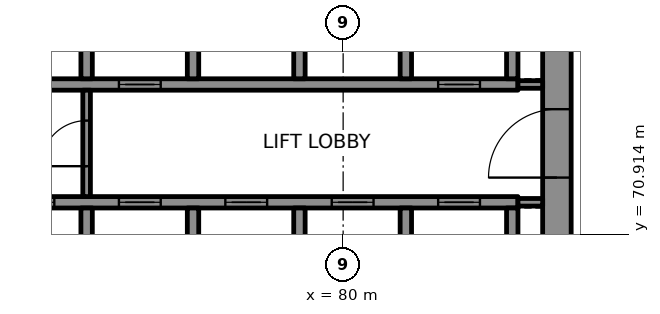
"""IFC4 building model, lengths in metres.
Left out: names, types, materials, properties, quantities, classifications, styles, units other than length and angle.
Written with IfcOpenShell. Run it as: python <this file> out.ifc"""

import sys

from ifc_helpers import new_model, si_unit, direction, frame, frame_2d, origin, place, context, subcontext, project, spatial, rectangle, extrude, element, fill, save


model = new_model("IFC4")
c1 = context("Model", 3, precision=1e-05, world=origin(), true_north=direction((0.0, 1.0)))
c2 = subcontext(c1, "Body", "Model", "MODEL_VIEW")
j1 = project(units=[si_unit("LENGTHUNIT", "METRE"), si_unit("PLANEANGLEUNIT", "RADIAN")], contexts=[c1])
p1 = place(None, origin())
s1 = spatial("IfcSite", under=j1, at=p1, CompositionType="ELEMENT")
p2 = place(p1, origin())
s2 = spatial("IfcBuilding", under=s1, at=p2, CompositionType="ELEMENT")
p3 = place(p2, frame((0.0, 0.0, 163.6)))
s3 = spatial("IfcBuildingStorey", under=s2, at=p3, CompositionType="ELEMENT", Elevation=163.6)
p4 = place(p3, frame((85.625, 67.75, 0.0), z_axis=(0.0, 0.0, 1.0), x_axis=(0.0, 1.0, 0.0)))
e1 = element("IfcWall", 1, at=p4, inside=s3, PredefinedType="SHEAR", context=c2, shape_type="SweptSolid", body=[
    extrude(rectangle(XDim=14.5, YDim=0.75, at=frame_2d((7.25, 0.0))), origin(), (0.0, 0.0, 1.0), 3.7),
])
p5 = place(p4, frame((4.65, 0.0, 0.0)))
e2 = element("IfcOpeningElement", 2, at=p5, cuts=e1, PredefinedType="OPENING", context=c2, shape_type="SweptSolid", body=[
    extrude(rectangle(XDim=1.8, YDim=2.1, at=frame_2d((0.9, 1.05))), frame((0.0, 0.385, 0.0), z_axis=(0.0, -1.0, 0.0), x_axis=(1.0, 0.0, 0.0)), (0.0, 0.0, 1.0), 0.77),
])
p6 = place(p4, frame((11.8, 0.0, 0.0)))
e3 = element("IfcOpeningElement", 3, at=p6, cuts=e1, PredefinedType="OPENING", context=c2, shape_type="SweptSolid", body=[
    extrude(rectangle(XDim=0.9, YDim=2.1, at=frame_2d((0.45, 1.05))), frame((0.0, 0.385, 0.0), z_axis=(0.0, -1.0, 0.0), x_axis=(1.0, 0.0, 0.0)), (0.0, 0.0, 1.0), 0.77),
])
p7 = place(p3, frame((70.3, 71.75, 0.0), z_axis=(0.0, 0.0, 1.0), x_axis=(1.0, 0.0, 0.0)))
e4 = element("IfcWall", 4, at=p7, inside=s3, PredefinedType="SHEAR", context=c2, shape_type="SweptSolid", body=[
    extrude(rectangle(XDim=14.3, YDim=0.3, at=frame_2d((7.15, 0.0))), origin(), (0.0, 0.0, 1.0), 3.7),
])
p8 = place(p7, frame((1.0, 0.0, 0.0)))
e5 = element("IfcOpeningElement", 5, at=p8, cuts=e4, PredefinedType="OPENING", context=c2, shape_type="SweptSolid", body=[
    extrude(rectangle(XDim=1.1, YDim=2.1, at=frame_2d((0.55, 1.05))), frame((0.0, 0.16, 0.0), z_axis=(0.0, -1.0, 0.0), x_axis=(1.0, 0.0, 0.0)), (0.0, 0.0, 1.0), 0.32),
])
p9 = place(p7, frame((3.8, 0.0, 0.0)))
e6 = element("IfcOpeningElement", 6, at=p9, cuts=e4, PredefinedType="OPENING", context=c2, shape_type="SweptSolid", body=[
    extrude(rectangle(XDim=1.1, YDim=2.1, at=frame_2d((0.55, 1.05))), frame((0.0, 0.16, 0.0), z_axis=(0.0, -1.0, 0.0), x_axis=(1.0, 0.0, 0.0)), (0.0, 0.0, 1.0), 0.32),
])
p10 = place(p7, frame((6.6, 0.0, 0.0)))
e7 = element("IfcOpeningElement", 7, at=p10, cuts=e4, PredefinedType="OPENING", context=c2, shape_type="SweptSolid", body=[
    extrude(rectangle(XDim=1.1, YDim=2.1, at=frame_2d((0.55, 1.05))), frame((0.0, 0.16, 0.0), z_axis=(0.0, -1.0, 0.0), x_axis=(1.0, 0.0, 0.0)), (0.0, 0.0, 1.0), 0.32),
])
p11 = place(p7, frame((9.4, 0.0, 0.0)))
e8 = element("IfcOpeningElement", 8, at=p11, cuts=e4, PredefinedType="OPENING", context=c2, shape_type="SweptSolid", body=[
    extrude(rectangle(XDim=1.1, YDim=2.1, at=frame_2d((0.55, 1.05))), frame((0.0, 0.16, 0.0), z_axis=(0.0, -1.0, 0.0), x_axis=(1.0, 0.0, 0.0)), (0.0, 0.0, 1.0), 0.32),
])
p12 = place(p7, frame((12.2, 0.0, 0.0)))
e9 = element("IfcOpeningElement", 9, at=p12, cuts=e4, PredefinedType="OPENING", context=c2, shape_type="SweptSolid", body=[
    extrude(rectangle(XDim=1.1, YDim=2.1, at=frame_2d((0.55, 1.05))), frame((0.0, 0.16, 0.0), z_axis=(0.0, -1.0, 0.0), x_axis=(1.0, 0.0, 0.0)), (0.0, 0.0, 1.0), 0.32),
])
p13 = place(p3, frame((70.3, 74.85, 0.0), z_axis=(0.0, 0.0, 1.0), x_axis=(1.0, 0.0, 0.0)))
e10 = element("IfcWall", 10, at=p13, inside=s3, PredefinedType="SHEAR", context=c2, shape_type="SweptSolid", body=[
    extrude(rectangle(XDim=14.3, YDim=0.3, at=frame_2d((7.15, 0.0))), origin(), (0.0, 0.0, 1.0), 3.7),
])
p14 = place(p13, frame((3.8, 0.0, 0.0)))
e11 = element("IfcOpeningElement", 11, at=p14, cuts=e10, PredefinedType="OPENING", context=c2, shape_type="SweptSolid", body=[
    extrude(rectangle(XDim=1.1, YDim=2.1, at=frame_2d((0.55, 1.05))), frame((0.0, 0.16, 0.0), z_axis=(0.0, -1.0, 0.0), x_axis=(1.0, 0.0, 0.0)), (0.0, 0.0, 1.0), 0.32),
])
p15 = place(p13, frame((12.2, 0.0, 0.0)))
e12 = element("IfcOpeningElement", 12, at=p15, cuts=e10, PredefinedType="OPENING", context=c2, shape_type="SweptSolid", body=[
    extrude(rectangle(XDim=1.1, YDim=2.1, at=frame_2d((0.55, 1.05))), frame((0.0, 0.16, 0.0), z_axis=(0.0, -1.0, 0.0), x_axis=(1.0, 0.0, 0.0)), (0.0, 0.0, 1.0), 0.32),
])
for number, where, z_axis, x_axis in (
    (13, (73.25, 69.0, 0.0), (0.0, 0.0, 1.0), (0.0, 1.0, 0.0)),
    (14, (73.25, 75.0, 0.0), (0.0, 0.0, 1.0), (0.0, 1.0, 0.0)),
    (15, (76.05, 69.0, 0.0), (0.0, 0.0, 1.0), (0.0, 1.0, 0.0)),
    (16, (76.05, 75.0, 0.0), (0.0, 0.0, 1.0), (0.0, 1.0, 0.0)),
    (17, (78.85, 69.0, 0.0), (0.0, 0.0, 1.0), (0.0, 1.0, 0.0)),
    (18, (78.85, 75.0, 0.0), (0.0, 0.0, 1.0), (0.0, 1.0, 0.0)),
    (19, (81.65, 69.0, 0.0), (0.0, 0.0, 1.0), (0.0, 1.0, 0.0)),
    (20, (81.65, 75.0, 0.0), (0.0, 0.0, 1.0), (0.0, 1.0, 0.0)),
    (21, (84.45, 69.0, 0.0), (0.0, 0.0, 1.0), (0.0, 1.0, 0.0)),
    (22, (84.45, 75.0, 0.0), (0.0, 0.0, 1.0), (0.0, 1.0, 0.0)),
):
    element("IfcWall", number, at=place(p3, frame(where, z_axis=z_axis, x_axis=x_axis)), inside=s3, PredefinedType="SHEAR", context=c2, shape_type="SweptSolid", body=[
        extrude(rectangle(XDim=2.6, YDim=0.3, at=frame_2d((1.3, 0.0))), origin(), (0.0, 0.0, 1.0), 3.7),
    ])
for number, where, z_axis, x_axis in (
    (23, (84.6, 71.75, 0.0), (0.0, 0.0, 1.0), (1.0, 0.0, 0.0)),
    (24, (84.6, 74.85, 0.0), (0.0, 0.0, 1.0), (1.0, 0.0, 0.0)),
):
    element("IfcWall", number, at=place(p3, frame(where, z_axis=z_axis, x_axis=x_axis)), inside=s3, PredefinedType="PARTITIONING", context=c2, shape_type="SweptSolid", body=[
        extrude(rectangle(XDim=0.65, YDim=0.2, at=frame_2d((0.325, 0.0))), origin(), (0.0, 0.0, 1.0), 3.7),
    ])
p16 = place(p3, frame((73.25, 71.9, 0.0), z_axis=(0.0, 0.0, 1.0), x_axis=(0.0, 1.0, 0.0)))
e25 = element("IfcWall", 25, at=p16, inside=s3, PredefinedType="PARTITIONING", context=c2, shape_type="SweptSolid", body=[
    extrude(rectangle(XDim=2.8, YDim=0.2, at=frame_2d((1.4, 0.0))), origin(), (0.0, 0.0, 1.0), 3.7),
])
p17 = place(p16, frame((0.8, 0.0, 0.0)))
e26 = element("IfcOpeningElement", 26, at=p17, cuts=e25, PredefinedType="OPENING", context=c2, shape_type="SweptSolid", body=[
    extrude(rectangle(XDim=1.2, YDim=2.1, at=frame_2d((0.6, 1.05))), frame((0.0, 0.11, 0.0), z_axis=(0.0, -1.0, 0.0), x_axis=(1.0, 0.0, 0.0)), (0.0, 0.0, 1.0), 0.22),
])
p18 = place(p8, origin())
e27 = element("IfcDoor", 27, at=p18, inside=s3, OperationType="DOUBLE_DOOR_SLIDING", PredefinedType="DOOR", context=c2, shape_type="SweptSolid", body=[
    extrude(rectangle(XDim=1.1, YDim=2.1, at=frame_2d((0.55, 1.05))), frame((0.0, 0.025, 0.0), z_axis=(0.0, -1.0, 0.0), x_axis=(1.0, 0.0, 0.0)), (0.0, 0.0, 1.0), 0.05),
])
fill(e5, e27)
p19 = place(p9, origin())
e28 = element("IfcDoor", 28, at=p19, inside=s3, OperationType="DOUBLE_DOOR_SLIDING", PredefinedType="DOOR", context=c2, shape_type="SweptSolid", body=[
    extrude(rectangle(XDim=1.1, YDim=2.1, at=frame_2d((0.55, 1.05))), frame((0.0, 0.025, 0.0), z_axis=(0.0, -1.0, 0.0), x_axis=(1.0, 0.0, 0.0)), (0.0, 0.0, 1.0), 0.05),
])
fill(e6, e28)
p20 = place(p10, origin())
e29 = element("IfcDoor", 29, at=p20, inside=s3, OperationType="DOUBLE_DOOR_SLIDING", PredefinedType="DOOR", context=c2, shape_type="SweptSolid", body=[
    extrude(rectangle(XDim=1.1, YDim=2.1, at=frame_2d((0.55, 1.05))), frame((0.0, 0.025, 0.0), z_axis=(0.0, -1.0, 0.0), x_axis=(1.0, 0.0, 0.0)), (0.0, 0.0, 1.0), 0.05),
])
fill(e7, e29)
p21 = place(p11, origin())
e30 = element("IfcDoor", 30, at=p21, inside=s3, OperationType="DOUBLE_DOOR_SLIDING", PredefinedType="DOOR", context=c2, shape_type="SweptSolid", body=[
    extrude(rectangle(XDim=1.1, YDim=2.1, at=frame_2d((0.55, 1.05))), frame((0.0, 0.025, 0.0), z_axis=(0.0, -1.0, 0.0), x_axis=(1.0, 0.0, 0.0)), (0.0, 0.0, 1.0), 0.05),
])
fill(e8, e30)
p22 = place(p12, origin())
e31 = element("IfcDoor", 31, at=p22, inside=s3, OperationType="DOUBLE_DOOR_SLIDING", PredefinedType="DOOR", context=c2, shape_type="SweptSolid", body=[
    extrude(rectangle(XDim=1.1, YDim=2.1, at=frame_2d((0.55, 1.05))), frame((0.0, 0.025, 0.0), z_axis=(0.0, -1.0, 0.0), x_axis=(1.0, 0.0, 0.0)), (0.0, 0.0, 1.0), 0.05),
])
fill(e9, e31)
p23 = place(p14, origin())
e32 = element("IfcDoor", 32, at=p23, inside=s3, OperationType="DOUBLE_DOOR_SLIDING", PredefinedType="DOOR", context=c2, shape_type="SweptSolid", body=[
    extrude(rectangle(XDim=1.1, YDim=2.1, at=frame_2d((0.55, 1.05))), frame((0.0, 0.025, 0.0), z_axis=(0.0, -1.0, 0.0), x_axis=(1.0, 0.0, 0.0)), (0.0, 0.0, 1.0), 0.05),
])
fill(e11, e32)
p24 = place(p15, origin())
e33 = element("IfcDoor", 33, at=p24, inside=s3, OperationType="DOUBLE_DOOR_SLIDING", PredefinedType="DOOR", context=c2, shape_type="SweptSolid", body=[
    extrude(rectangle(XDim=1.1, YDim=2.1, at=frame_2d((0.55, 1.05))), frame((0.0, 0.025, 0.0), z_axis=(0.0, -1.0, 0.0), x_axis=(1.0, 0.0, 0.0)), (0.0, 0.0, 1.0), 0.05),
])
fill(e12, e33)
p25 = place(p17, origin())
e34 = element("IfcDoor", 34, at=p25, inside=s3, OperationType="SINGLE_SWING_LEFT", PredefinedType="DOOR", context=c2, shape_type="SweptSolid", body=[
    extrude(rectangle(XDim=1.2, YDim=2.1, at=frame_2d((0.6, 1.05))), frame((0.0, 0.025, 0.0), z_axis=(0.0, -1.0, 0.0), x_axis=(1.0, 0.0, 0.0)), (0.0, 0.0, 1.0), 0.05),
])
fill(e26, e34)
p26 = place(p5, origin())
e35 = element("IfcDoor", 35, at=p26, inside=s3, OperationType="SINGLE_SWING_RIGHT", PredefinedType="DOOR", context=c2, shape_type="SweptSolid", body=[
    extrude(rectangle(XDim=1.8, YDim=2.1, at=frame_2d((0.9, 1.05))), frame((0.0, 0.095, 0.0), z_axis=(0.0, -1.0, 0.0), x_axis=(1.0, 0.0, 0.0)), (0.0, 0.0, 1.0), 0.19),
])
fill(e2, e35)
save(model, sys.argv[1])
